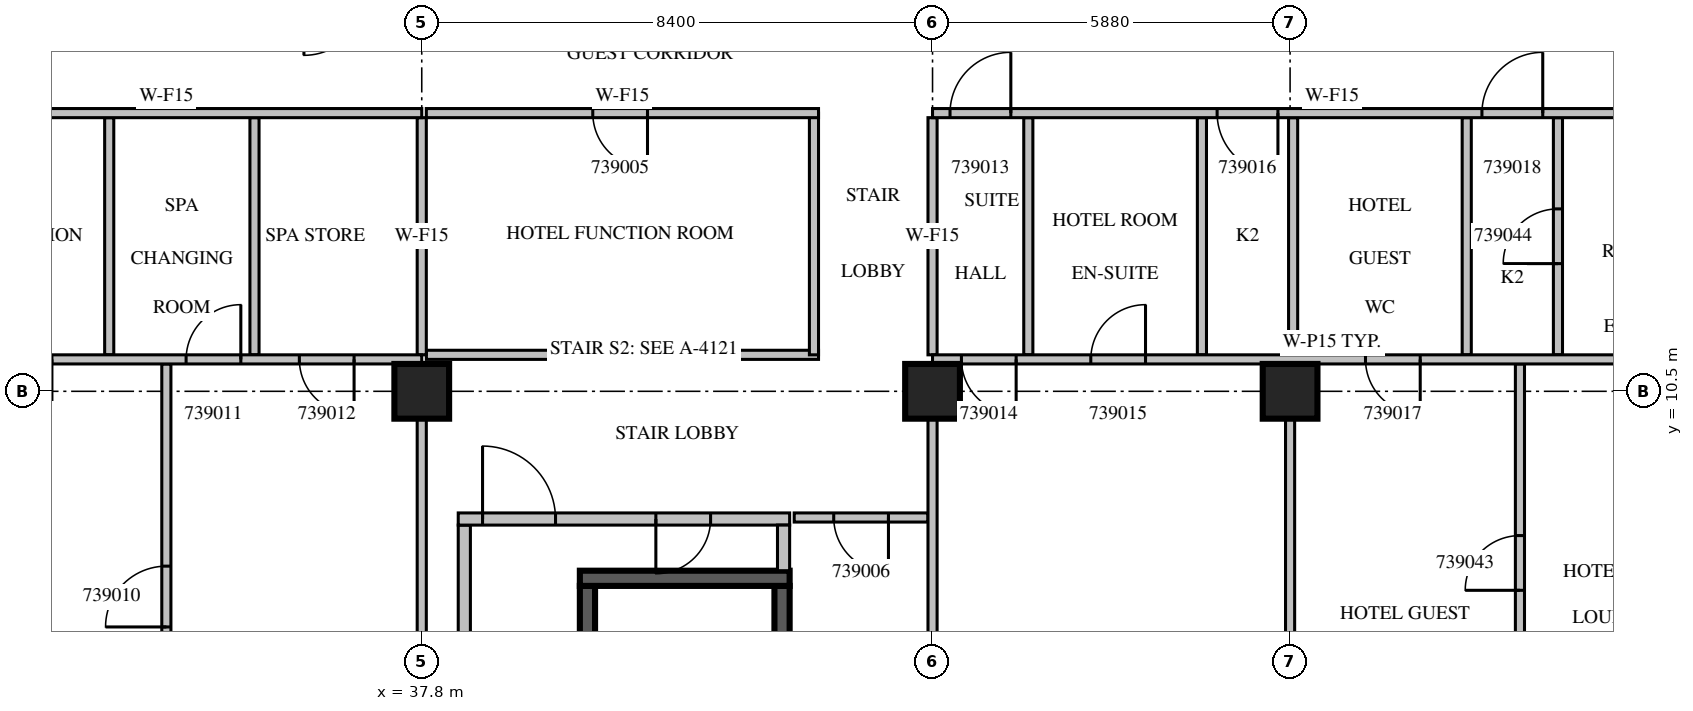
"""IFC4 building model, lengths in metres.
Left out: names, types, materials, properties, quantities, classifications, styles, units other than length and angle.
Written with IfcOpenShell. Run it as: python <this file> out.ifc"""

import sys

from ifc_helpers import new_model, si_unit, direction, frame, frame_2d, origin, origin_2d, place, context, subcontext, project, spatial, rectangle, extrude, source, transform, mapped, element, fill, save


model = new_model("IFC4")
c1 = context("Model", 3, precision=1e-05, world=origin(), true_north=direction((0.0, 1.0)))
c2 = subcontext(c1, "Body", "Model", "MODEL_VIEW")
j1 = project(units=[si_unit("LENGTHUNIT", "METRE"), si_unit("PLANEANGLEUNIT", "RADIAN")], contexts=[c1])
p1 = place(None, origin())
s1 = spatial("IfcSite", under=j1, at=p1, CompositionType="ELEMENT")
p2 = place(p1, origin())
s2 = spatial("IfcBuilding", under=s1, at=p2, CompositionType="ELEMENT")
p3 = place(p2, frame((0.0, 0.0, 181.6)))
s3 = spatial("IfcBuildingStorey", under=s2, at=p3, CompositionType="ELEMENT", Elevation=181.6)
m1 = source(origin(), c2, "Body", "SweptSolid", [
    extrude(rectangle(XDim=0.9, YDim=0.9, at=origin_2d()), origin(), (0.0, 0.0, 1.0), 3.8),
])
for number, where, z_axis, x_axis in (
    (1, (37.8, 10.5, 0.0), (0.0, 0.0, 1.0), (1.0, 0.0, 0.0)),
    (2, (46.2, 10.5, 0.0), (0.0, 0.0, 1.0), (1.0, 0.0, 0.0)),
    (3, (52.08, 10.5, 0.0), (0.0, 0.0, 1.0), (1.0, 0.0, 0.0)),
):
    element("IfcColumn", number, at=place(p3, frame(where, z_axis=z_axis, x_axis=x_axis)), inside=s3, PredefinedType="COLUMN", context=c2, shape_type="MappedRepresentation", body=[
        mapped(m1, transform((0.0, 0.0, 0.0), scale=1.0)),
    ])
m2 = source(origin(), c2, "Body", "SweptSolid", [
    extrude(rectangle(XDim=7.0, YDim=0.25, at=frame_2d((3.5, 0.0))), origin(), (0.0, 0.0, 1.0), 3.4),
])
p4 = place(p3, frame((40.525, 0.3, 0.0), z_axis=(0.0, 0.0, 1.0), x_axis=(0.0, 1.0, 0.0)))
e4 = element("IfcWall", 4, at=p4, inside=s3, PredefinedType="SOLIDWALL", context=c2, shape_type="MappedRepresentation", body=[
    mapped(m2, transform((0.0, 0.0, 0.0), scale=1.0)),
])
m3 = source(origin(), c2, "Body", "SweptSolid", [
    extrude(rectangle(XDim=1.1, YDim=2.1, at=frame_2d((0.55, 1.05))), frame((0.0, 0.135, 0.0), z_axis=(0.0, -1.0, 0.0), x_axis=(1.0, 0.0, 0.0)), (0.0, 0.0, 1.0), 0.27),
])
p5 = place(p4, frame((0.55, 0.0, 0.0)))
e5 = element("IfcOpeningElement", 5, at=p5, cuts=e4, PredefinedType="OPENING", context=c2, shape_type="MappedRepresentation", body=[
    mapped(m3, transform((0.0, 0.0, 0.0), scale=1.0)),
])
p6 = place(p3, frame((43.725, 0.3, 0.0), z_axis=(0.0, 0.0, 1.0), x_axis=(0.0, 1.0, 0.0)))
e6 = element("IfcWall", 6, at=p6, inside=s3, PredefinedType="SOLIDWALL", context=c2, shape_type="MappedRepresentation", body=[
    mapped(m2, transform((0.0, 0.0, 0.0), scale=1.0)),
])
m4 = source(origin(), c2, "Body", "SweptSolid", [
    extrude(rectangle(XDim=3.45, YDim=0.25, at=frame_2d((1.725, 0.0))), origin(), (0.0, 0.0, 1.0), 3.4),
])
p7 = place(p3, frame((40.4, 7.425, 0.0), z_axis=(0.0, 0.0, 1.0), x_axis=(1.0, 0.0, 0.0)))
e7 = element("IfcWall", 7, at=p7, inside=s3, PredefinedType="SOLIDWALL", context=c2, shape_type="MappedRepresentation", body=[
    mapped(m4, transform((0.0, 0.0, 0.0), scale=1.0)),
])
m5 = source(origin(), c2, "Body", "SweptSolid", [
    extrude(rectangle(XDim=8.0, YDim=0.2, at=frame_2d((4.0, 0.0))), origin(), (0.0, 0.0, 1.0), 3.4),
])
p8 = place(p3, frame((38.5, 0.3, 0.0), z_axis=(0.0, 0.0, 1.0), x_axis=(0.0, 1.0, 0.0)))
e8 = element("IfcWall", 8, at=p8, inside=s3, PredefinedType="PARTITIONING", context=c2, shape_type="MappedRepresentation", body=[
    mapped(m5, transform((0.0, 0.0, 0.0), scale=1.0)),
])
m6 = source(origin(), c2, "Body", "SweptSolid", [
    extrude(rectangle(XDim=5.45, YDim=0.2, at=frame_2d((2.725, 0.0))), origin(), (0.0, 0.0, 1.0), 3.4),
])
p9 = place(p3, frame((38.4, 8.4, 0.0), z_axis=(0.0, 0.0, 1.0), x_axis=(1.0, 0.0, 0.0)))
e9 = element("IfcWall", 9, at=p9, inside=s3, PredefinedType="PARTITIONING", context=c2, shape_type="MappedRepresentation", body=[
    mapped(m6, transform((0.0, 0.0, 0.0), scale=1.0)),
])
m7 = source(origin(), c2, "Body", "SweptSolid", [
    extrude(rectangle(XDim=1.2, YDim=2.1, at=frame_2d((0.6, 1.05))), frame((0.0, 0.11, 0.0), z_axis=(0.0, -1.0, 0.0), x_axis=(1.0, 0.0, 0.0)), (0.0, 0.0, 1.0), 0.22),
])
p10 = place(p9, frame((0.4, 0.0, 0.0)))
e10 = element("IfcOpeningElement", 10, at=p10, cuts=e9, PredefinedType="OPENING", context=c2, shape_type="MappedRepresentation", body=[
    mapped(m7, transform((0.0, 0.0, 0.0), scale=1.0)),
])
m8 = source(origin(), c2, "Body", "SweptSolid", [
    extrude(rectangle(XDim=0.9, YDim=2.1, at=frame_2d((0.45, 1.05))), frame((0.0, 0.11, 0.0), z_axis=(0.0, -1.0, 0.0), x_axis=(1.0, 0.0, 0.0)), (0.0, 0.0, 1.0), 0.22),
])
p11 = place(p9, frame((3.25, 0.0, 0.0)))
e11 = element("IfcOpeningElement", 11, at=p11, cuts=e9, PredefinedType="OPENING", context=c2, shape_type="MappedRepresentation", body=[
    mapped(m8, transform((0.0, 0.0, 0.0), scale=1.0)),
])
m9 = source(origin(), c2, "Body", "SweptSolid", [
    extrude(rectangle(XDim=0.75, YDim=0.2, at=frame_2d((0.375, 0.0))), origin(), (0.0, 0.0, 1.0), 3.4),
])
p12 = place(p3, frame((43.75, 7.55, 0.0), z_axis=(0.0, 0.0, 1.0), x_axis=(0.0, 1.0, 0.0)))
e12 = element("IfcWall", 12, at=p12, inside=s3, PredefinedType="PARTITIONING", context=c2, shape_type="MappedRepresentation", body=[
    mapped(m9, transform((0.0, 0.0, 0.0), scale=1.0)),
])
m10 = source(origin(), c2, "Body", "SweptSolid", [
    extrude(rectangle(XDim=6.45, YDim=0.15, at=frame_2d((3.225, 0.0))), origin(), (0.0, 0.0, 1.0), 3.4),
])
p13 = place(p3, frame((37.875, 11.1, 0.0), z_axis=(0.0, 0.0, 1.0), x_axis=(1.0, 0.0, 0.0)))
e13 = element("IfcWall", 13, at=p13, inside=s3, PredefinedType="PARTITIONING", context=c2, shape_type="MappedRepresentation", body=[
    mapped(m10, transform((0.0, 0.0, 0.0), scale=1.0)),
])
m11 = source(origin(), c2, "Body", "SweptSolid", [
    extrude(rectangle(XDim=3.975, YDim=0.15, at=frame_2d((1.988, 0.0))), origin(), (0.0, 0.0, 1.0), 3.4),
])
p14 = place(p3, frame((44.25, 11.1, 0.0), z_axis=(0.0, 0.0, 1.0), x_axis=(0.0, 1.0, 0.0)))
e14 = element("IfcWall", 14, at=p14, inside=s3, PredefinedType="PARTITIONING", context=c2, shape_type="MappedRepresentation", body=[
    mapped(m11, transform((0.0, 0.0, 0.0), scale=1.0)),
])
p15 = place(p3, frame((44.325, 15.075, 0.0), z_axis=(0.0, 0.0, 1.0), x_axis=(-1.0, 0.0, 0.0)))
e15 = element("IfcWall", 15, at=p15, inside=s3, PredefinedType="PARTITIONING", context=c2, shape_type="MappedRepresentation", body=[
    mapped(m10, transform((0.0, 0.0, 0.0), scale=1.0)),
])
m12 = source(origin(), c2, "Body", "SweptSolid", [
    extrude(rectangle(XDim=0.9, YDim=2.1, at=frame_2d((0.45, 1.05))), frame((0.0, 0.085, 0.0), z_axis=(0.0, -1.0, 0.0), x_axis=(1.0, 0.0, 0.0)), (0.0, 0.0, 1.0), 0.17),
])
p16 = place(p15, frame((2.812, 0.0, 0.0)))
e16 = element("IfcOpeningElement", 16, at=p16, cuts=e15, PredefinedType="OPENING", context=c2, shape_type="MappedRepresentation", body=[
    mapped(m12, transform((0.0, 0.0, 0.0), scale=1.0)),
])
m13 = source(origin(), c2, "Body", "SweptSolid", [
    extrude(rectangle(XDim=2.2, YDim=0.15, at=frame_2d((1.1, 0.0))), origin(), (0.0, 0.0, 1.0), 3.4),
])
p17 = place(p3, frame((46.125, 8.425, 0.0), z_axis=(0.0, 0.0, 1.0), x_axis=(-1.0, 0.0, 0.0)))
e17 = element("IfcWall", 17, at=p17, inside=s3, PredefinedType="PARTITIONING", context=c2, shape_type="MappedRepresentation", body=[
    mapped(m13, transform((0.0, 0.0, 0.0), scale=1.0)),
])
p18 = place(p17, frame((0.65, 0.0, 0.0)))
e18 = element("IfcOpeningElement", 18, at=p18, cuts=e17, PredefinedType="OPENING", context=c2, shape_type="MappedRepresentation", body=[
    mapped(m12, transform((0.0, 0.0, 0.0), scale=1.0)),
])
m14 = source(origin(), c2, "Body", "SweptSolid", [
    extrude(rectangle(XDim=10.65, YDim=0.15, at=frame_2d((5.325, 0.0))), origin(), (0.0, 0.0, 1.0), 3.4),
])
p19 = place(p3, frame((33.6, 0.3, 0.0), z_axis=(0.0, 0.0, 1.0), x_axis=(0.0, 1.0, 0.0)))
e19 = element("IfcWall", 19, at=p19, inside=s3, PredefinedType="PARTITIONING", context=c2, shape_type="MappedRepresentation", body=[
    mapped(m14, transform((0.0, 0.0, 0.0), scale=1.0)),
])
m15 = source(origin(), c2, "Body", "SweptSolid", [
    extrude(rectangle(XDim=1.0, YDim=2.1, at=frame_2d((0.5, 1.05))), frame((0.0, 0.085, 0.0), z_axis=(0.0, -1.0, 0.0), x_axis=(1.0, 0.0, 0.0)), (0.0, 0.0, 1.0), 0.17),
])
p20 = place(p19, frame((6.325, 0.0, 0.0)))
e20 = element("IfcOpeningElement", 20, at=p20, cuts=e19, PredefinedType="OPENING", context=c2, shape_type="MappedRepresentation", body=[
    mapped(m15, transform((0.0, 0.0, 0.0), scale=1.0)),
])
m16 = source(origin(), c2, "Body", "SweptSolid", [
    extrude(rectangle(XDim=3.9, YDim=0.15, at=frame_2d((1.95, 0.0))), origin(), (0.0, 0.0, 1.0), 3.4),
])
for number, where, z_axis, x_axis in (
    (21, (32.66, 11.1, 0.0), (0.0, 0.0, 1.0), (0.0, 1.0, 0.0)),
    (22, (35.049, 11.1, 0.0), (0.0, 0.0, 1.0), (0.0, 1.0, 0.0)),
):
    element("IfcWall", number, at=place(p3, frame(where, z_axis=z_axis, x_axis=x_axis)), inside=s3, PredefinedType="PARTITIONING", context=c2, shape_type="MappedRepresentation", body=[
        mapped(m16, transform((0.0, 0.0, 0.0), scale=1.0)),
    ])
m17 = source(origin(), c2, "Body", "SweptSolid", [
    extrude(rectangle(XDim=9.152, YDim=0.15, at=frame_2d((4.576, 0.0))), origin(), (0.0, 0.0, 1.0), 3.4),
])
p21 = place(p3, frame((37.8, 0.899, 0.0), z_axis=(0.0, 0.0, 1.0), x_axis=(0.0, 1.0, 0.0)))
e23 = element("IfcWall", 23, at=p21, inside=s3, PredefinedType="PARTITIONING", context=c2, shape_type="MappedRepresentation", body=[
    mapped(m17, transform((0.0, 0.0, 0.0), scale=1.0)),
])
p22 = place(p3, frame((37.8, 11.1, 0.0), z_axis=(0.0, 0.0, 1.0), x_axis=(0.0, 1.0, 0.0)))
e24 = element("IfcWall", 24, at=p22, inside=s3, PredefinedType="PARTITIONING", context=c2, shape_type="MappedRepresentation", body=[
    mapped(m16, transform((0.0, 0.0, 0.0), scale=1.0)),
])
m18 = source(origin(), c2, "Body", "SweptSolid", [
    extrude(rectangle(XDim=8.4, YDim=0.15, at=frame_2d((4.2, 0.0))), origin(), (0.0, 0.0, 1.0), 3.4),
])
p23 = place(p3, frame((37.8, 11.025, 0.0), z_axis=(0.0, 0.0, 1.0), x_axis=(-1.0, 0.0, 0.0)))
e25 = element("IfcWall", 25, at=p23, inside=s3, PredefinedType="PARTITIONING", context=c2, shape_type="MappedRepresentation", body=[
    mapped(m18, transform((0.0, 0.0, 0.0), scale=1.0)),
])
p24 = place(p23, frame((6.082, 0.0, 0.0)))
e26 = element("IfcOpeningElement", 26, at=p24, cuts=e25, PredefinedType="OPENING", context=c2, shape_type="MappedRepresentation", body=[
    mapped(m12, transform((0.0, 0.0, 0.0), scale=1.0)),
])
p25 = place(p23, frame((7.04, 0.0, 0.0)))
e27 = element("IfcOpeningElement", 27, at=p25, cuts=e25, PredefinedType="OPENING", context=c2, shape_type="MappedRepresentation", body=[
    mapped(m12, transform((0.0, 0.0, 0.0), scale=1.0)),
])
p26 = place(p23, frame((2.975, 0.0, 0.0)))
e28 = element("IfcOpeningElement", 28, at=p26, cuts=e25, PredefinedType="OPENING", context=c2, shape_type="MappedRepresentation", body=[
    mapped(m12, transform((0.0, 0.0, 0.0), scale=1.0)),
])
p27 = place(p23, frame((1.113, 0.0, 0.0)))
e29 = element("IfcOpeningElement", 29, at=p27, cuts=e25, PredefinedType="OPENING", context=c2, shape_type="MappedRepresentation", body=[
    mapped(m12, transform((0.0, 0.0, 0.0), scale=1.0)),
])
p28 = place(p3, frame((52.08, 0.899, 0.0), z_axis=(0.0, 0.0, 1.0), x_axis=(0.0, 1.0, 0.0)))
e30 = element("IfcWall", 30, at=p28, inside=s3, PredefinedType="PARTITIONING", context=c2, shape_type="MappedRepresentation", body=[
    mapped(m17, transform((0.0, 0.0, 0.0), scale=1.0)),
])
p29 = place(p28, frame((4.126, 0.0, 0.0)))
e31 = element("IfcOpeningElement", 31, at=p29, cuts=e30, PredefinedType="OPENING", context=c2, shape_type="MappedRepresentation", body=[
    mapped(m12, transform((0.0, 0.0, 0.0), scale=1.0)),
])
m19 = source(origin(), c2, "Body", "SweptSolid", [
    extrude(rectangle(XDim=6.545, YDim=0.15, at=frame_2d((3.272, 0.0))), origin(), (0.0, 0.0, 1.0), 3.4),
])
p30 = place(p3, frame((55.86, 4.405, 0.0), z_axis=(0.0, 0.0, 1.0), x_axis=(0.0, 1.0, 0.0)))
e32 = element("IfcWall", 32, at=p30, inside=s3, PredefinedType="PARTITIONING", context=c2, shape_type="MappedRepresentation", body=[
    mapped(m19, transform((0.0, 0.0, 0.0), scale=1.0)),
])
p31 = place(p30, frame((2.822, 0.0, 0.0)))
e33 = element("IfcOpeningElement", 33, at=p31, cuts=e32, PredefinedType="OPENING", context=c2, shape_type="MappedRepresentation", body=[
    mapped(m12, transform((0.0, 0.0, 0.0), scale=1.0)),
])
for number, where, z_axis, x_axis in (
    (34, (47.775, 11.1, 0.0), (0.0, 0.0, 1.0), (0.0, 1.0, 0.0)),
    (35, (50.63, 11.1, 0.0), (0.0, 0.0, 1.0), (0.0, 1.0, 0.0)),
    (36, (52.13, 11.1, 0.0), (0.0, 0.0, 1.0), (0.0, 1.0, 0.0)),
    (37, (54.985, 11.1, 0.0), (0.0, 0.0, 1.0), (0.0, 1.0, 0.0)),
):
    element("IfcWall", number, at=place(p3, frame(where, z_axis=z_axis, x_axis=x_axis)), inside=s3, PredefinedType="PARTITIONING", context=c2, shape_type="MappedRepresentation", body=[
        mapped(m16, transform((0.0, 0.0, 0.0), scale=1.0)),
    ])
p32 = place(p3, frame((56.485, 11.1, 0.0), z_axis=(0.0, 0.0, 1.0), x_axis=(0.0, 1.0, 0.0)))
e38 = element("IfcWall", 38, at=p32, inside=s3, PredefinedType="PARTITIONING", context=c2, shape_type="MappedRepresentation", body=[
    mapped(m16, transform((0.0, 0.0, 0.0), scale=1.0)),
])
p33 = place(p32, frame((1.5, 0.0, 0.0)))
e39 = element("IfcOpeningElement", 39, at=p33, cuts=e38, PredefinedType="OPENING", context=c2, shape_type="MappedRepresentation", body=[
    mapped(m12, transform((0.0, 0.0, 0.0), scale=1.0)),
])
p34 = place(p3, frame((46.2, 0.899, 0.0), z_axis=(0.0, 0.0, 1.0), x_axis=(0.0, 1.0, 0.0)))
e40 = element("IfcWall", 40, at=p34, inside=s3, PredefinedType="PARTITIONING", context=c2, shape_type="MappedRepresentation", body=[
    mapped(m17, transform((0.0, 0.0, 0.0), scale=1.0)),
])
p35 = place(p3, frame((46.2, 11.1, 0.0), z_axis=(0.0, 0.0, 1.0), x_axis=(0.0, 1.0, 0.0)))
e41 = element("IfcWall", 41, at=p35, inside=s3, PredefinedType="PARTITIONING", context=c2, shape_type="MappedRepresentation", body=[
    mapped(m16, transform((0.0, 0.0, 0.0), scale=1.0)),
])
m20 = source(origin(), c2, "Body", "SweptSolid", [
    extrude(rectangle(XDim=13.14, YDim=0.15, at=frame_2d((6.57, 0.0))), origin(), (0.0, 0.0, 1.0), 3.4),
])
p36 = place(p3, frame((59.34, 11.025, 0.0), z_axis=(0.0, 0.0, 1.0), x_axis=(-1.0, 0.0, 0.0)))
e42 = element("IfcWall", 42, at=p36, inside=s3, PredefinedType="PARTITIONING", context=c2, shape_type="MappedRepresentation", body=[
    mapped(m20, transform((0.0, 0.0, 0.0), scale=1.0)),
])
p37 = place(p36, frame((11.765, 0.0, 0.0)))
e43 = element("IfcOpeningElement", 43, at=p37, cuts=e42, PredefinedType="OPENING", context=c2, shape_type="MappedRepresentation", body=[
    mapped(m12, transform((0.0, 0.0, 0.0), scale=1.0)),
])
p38 = place(p36, frame((9.637, 0.0, 0.0)))
e44 = element("IfcOpeningElement", 44, at=p38, cuts=e42, PredefinedType="OPENING", context=c2, shape_type="MappedRepresentation", body=[
    mapped(m12, transform((0.0, 0.0, 0.0), scale=1.0)),
])
p39 = place(p36, frame((5.12, 0.0, 0.0)))
e45 = element("IfcOpeningElement", 45, at=p39, cuts=e42, PredefinedType="OPENING", context=c2, shape_type="MappedRepresentation", body=[
    mapped(m12, transform((0.0, 0.0, 0.0), scale=1.0)),
])
p40 = place(p3, frame((37.8, 15.075, 0.0), z_axis=(0.0, 0.0, 1.0), x_axis=(-1.0, 0.0, 0.0)))
e46 = element("IfcWall", 46, at=p40, inside=s3, PredefinedType="PARTITIONING", context=c2, shape_type="MappedRepresentation", body=[
    mapped(m18, transform((0.0, 0.0, 0.0), scale=1.0)),
])
m21 = source(origin(), c2, "Body", "SweptSolid", [
    extrude(rectangle(XDim=1.2, YDim=2.1, at=frame_2d((0.6, 1.05))), frame((0.0, 0.085, 0.0), z_axis=(0.0, -1.0, 0.0), x_axis=(1.0, 0.0, 0.0)), (0.0, 0.0, 1.0), 0.17),
])
p41 = place(p40, frame((6.17, 0.0, 0.0)))
e47 = element("IfcOpeningElement", 47, at=p41, cuts=e46, PredefinedType="OPENING", context=c2, shape_type="MappedRepresentation", body=[
    mapped(m21, transform((0.0, 0.0, 0.0), scale=1.0)),
])
p42 = place(p3, frame((59.34, 15.075, 0.0), z_axis=(0.0, 0.0, 1.0), x_axis=(-1.0, 0.0, 0.0)))
e48 = element("IfcWall", 48, at=p42, inside=s3, PredefinedType="PARTITIONING", context=c2, shape_type="MappedRepresentation", body=[
    mapped(m20, transform((0.0, 0.0, 0.0), scale=1.0)),
])
p43 = place(p42, frame((11.852, 0.0, 0.0)))
e49 = element("IfcOpeningElement", 49, at=p43, cuts=e48, PredefinedType="OPENING", context=c2, shape_type="MappedRepresentation", body=[
    mapped(m15, transform((0.0, 0.0, 0.0), scale=1.0)),
])
p44 = place(p42, frame((7.46, 0.0, 0.0)))
e50 = element("IfcOpeningElement", 50, at=p44, cuts=e48, PredefinedType="OPENING", context=c2, shape_type="MappedRepresentation", body=[
    mapped(m15, transform((0.0, 0.0, 0.0), scale=1.0)),
])
p45 = place(p42, frame((3.105, 0.0, 0.0)))
e51 = element("IfcOpeningElement", 51, at=p45, cuts=e48, PredefinedType="OPENING", context=c2, shape_type="MappedRepresentation", body=[
    mapped(m15, transform((0.0, 0.0, 0.0), scale=1.0)),
])
m22 = source(origin(), c2, "Body", "SweptSolid", [
    extrude(rectangle(XDim=1.2, YDim=2.1, at=frame_2d((0.6, 1.05))), frame((0.0, 0.025, 0.0), z_axis=(0.0, -1.0, 0.0), x_axis=(1.0, 0.0, 0.0)), (0.0, 0.0, 1.0), 0.05),
])
p46 = place(p10, origin())
e52 = element("IfcDoor", 52, at=p46, inside=s3, OperationType="SINGLE_SWING_LEFT", PredefinedType="DOOR", context=c2, shape_type="MappedRepresentation", body=[
    mapped(m22, transform((0.0, 0.0, 0.0), scale=1.0)),
])
fill(e10, e52)
m23 = source(origin(), c2, "Body", "SweptSolid", [
    extrude(rectangle(XDim=0.9, YDim=2.1, at=frame_2d((0.45, 1.05))), frame((0.0, 0.025, 0.0), z_axis=(0.0, -1.0, 0.0), x_axis=(1.0, 0.0, 0.0)), (0.0, 0.0, 1.0), 0.05),
])
p47 = place(p11, origin())
e53 = element("IfcDoor", 53, at=p47, inside=s3, OperationType="SINGLE_SWING_RIGHT", PredefinedType="DOOR", context=c2, shape_type="MappedRepresentation", body=[
    mapped(m23, transform((0.0, 0.0, 0.0), scale=1.0)),
])
fill(e11, e53)
p48 = place(p16, origin())
e54 = element("IfcDoor", 54, at=p48, inside=s3, OperationType="SINGLE_SWING_LEFT", PredefinedType="DOOR", context=c2, shape_type="MappedRepresentation", body=[
    mapped(m23, transform((0.0, 0.0, 0.0), scale=1.0)),
])
fill(e16, e54)
p49 = place(p18, origin())
e55 = element("IfcDoor", 55, at=p49, inside=s3, OperationType="SINGLE_SWING_LEFT", PredefinedType="DOOR", context=c2, shape_type="MappedRepresentation", body=[
    mapped(m23, transform((0.0, 0.0, 0.0), scale=1.0)),
])
fill(e18, e55)
m24 = source(origin(), c2, "Body", "SweptSolid", [
    extrude(rectangle(XDim=1.0, YDim=2.1, at=frame_2d((0.5, 1.05))), frame((0.0, 0.025, 0.0), z_axis=(0.0, -1.0, 0.0), x_axis=(1.0, 0.0, 0.0)), (0.0, 0.0, 1.0), 0.05),
])
p50 = place(p20, origin())
e56 = element("IfcDoor", 56, at=p50, inside=s3, OperationType="SINGLE_SWING_LEFT", PredefinedType="DOOR", context=c2, shape_type="MappedRepresentation", body=[
    mapped(m24, transform((0.0, 0.0, 0.0), scale=1.0)),
])
fill(e20, e56)
p51 = place(p26, origin())
e57 = element("IfcDoor", 57, at=p51, inside=s3, OperationType="SINGLE_SWING_RIGHT", PredefinedType="DOOR", context=c2, shape_type="MappedRepresentation", body=[
    mapped(m23, transform((0.0, 0.0, 0.0), scale=1.0)),
])
fill(e28, e57)
p52 = place(p27, origin())
e58 = element("IfcDoor", 58, at=p52, inside=s3, OperationType="SINGLE_SWING_LEFT", PredefinedType="DOOR", context=c2, shape_type="MappedRepresentation", body=[
    mapped(m23, transform((0.0, 0.0, 0.0), scale=1.0)),
])
fill(e29, e58)
p53 = place(p43, origin())
e59 = element("IfcDoor", 59, at=p53, inside=s3, OperationType="SINGLE_SWING_RIGHT", PredefinedType="DOOR", context=c2, shape_type="MappedRepresentation", body=[
    mapped(m24, transform((0.0, 0.0, 0.0), scale=1.0)),
])
fill(e49, e59)
p54 = place(p37, origin())
e60 = element("IfcDoor", 60, at=p54, inside=s3, OperationType="SINGLE_SWING_LEFT", PredefinedType="DOOR", context=c2, shape_type="MappedRepresentation", body=[
    mapped(m23, transform((0.0, 0.0, 0.0), scale=1.0)),
])
fill(e43, e60)
p55 = place(p38, origin())
e61 = element("IfcDoor", 61, at=p55, inside=s3, OperationType="SINGLE_SWING_RIGHT", PredefinedType="DOOR", context=c2, shape_type="MappedRepresentation", body=[
    mapped(m23, transform((0.0, 0.0, 0.0), scale=1.0)),
])
fill(e44, e61)
p56 = place(p44, origin())
e62 = element("IfcDoor", 62, at=p56, inside=s3, OperationType="SINGLE_SWING_LEFT", PredefinedType="DOOR", context=c2, shape_type="MappedRepresentation", body=[
    mapped(m24, transform((0.0, 0.0, 0.0), scale=1.0)),
])
fill(e50, e62)
p57 = place(p39, origin())
e63 = element("IfcDoor", 63, at=p57, inside=s3, OperationType="SINGLE_SWING_LEFT", PredefinedType="DOOR", context=c2, shape_type="MappedRepresentation", body=[
    mapped(m23, transform((0.0, 0.0, 0.0), scale=1.0)),
])
fill(e45, e63)
p58 = place(p45, origin())
e64 = element("IfcDoor", 64, at=p58, inside=s3, OperationType="SINGLE_SWING_RIGHT", PredefinedType="DOOR", context=c2, shape_type="MappedRepresentation", body=[
    mapped(m24, transform((0.0, 0.0, 0.0), scale=1.0)),
])
fill(e51, e64)
p59 = place(p31, origin())
e65 = element("IfcDoor", 65, at=p59, inside=s3, OperationType="SINGLE_SWING_LEFT", PredefinedType="DOOR", context=c2, shape_type="MappedRepresentation", body=[
    mapped(m23, transform((0.0, 0.0, 0.0), scale=1.0)),
])
fill(e33, e65)
p60 = place(p33, origin())
e66 = element("IfcDoor", 66, at=p60, inside=s3, OperationType="SINGLE_SWING_LEFT", PredefinedType="DOOR", context=c2, shape_type="MappedRepresentation", body=[
    mapped(m23, transform((0.0, 0.0, 0.0), scale=1.0)),
])
fill(e39, e66)
save(model, sys.argv[1])
